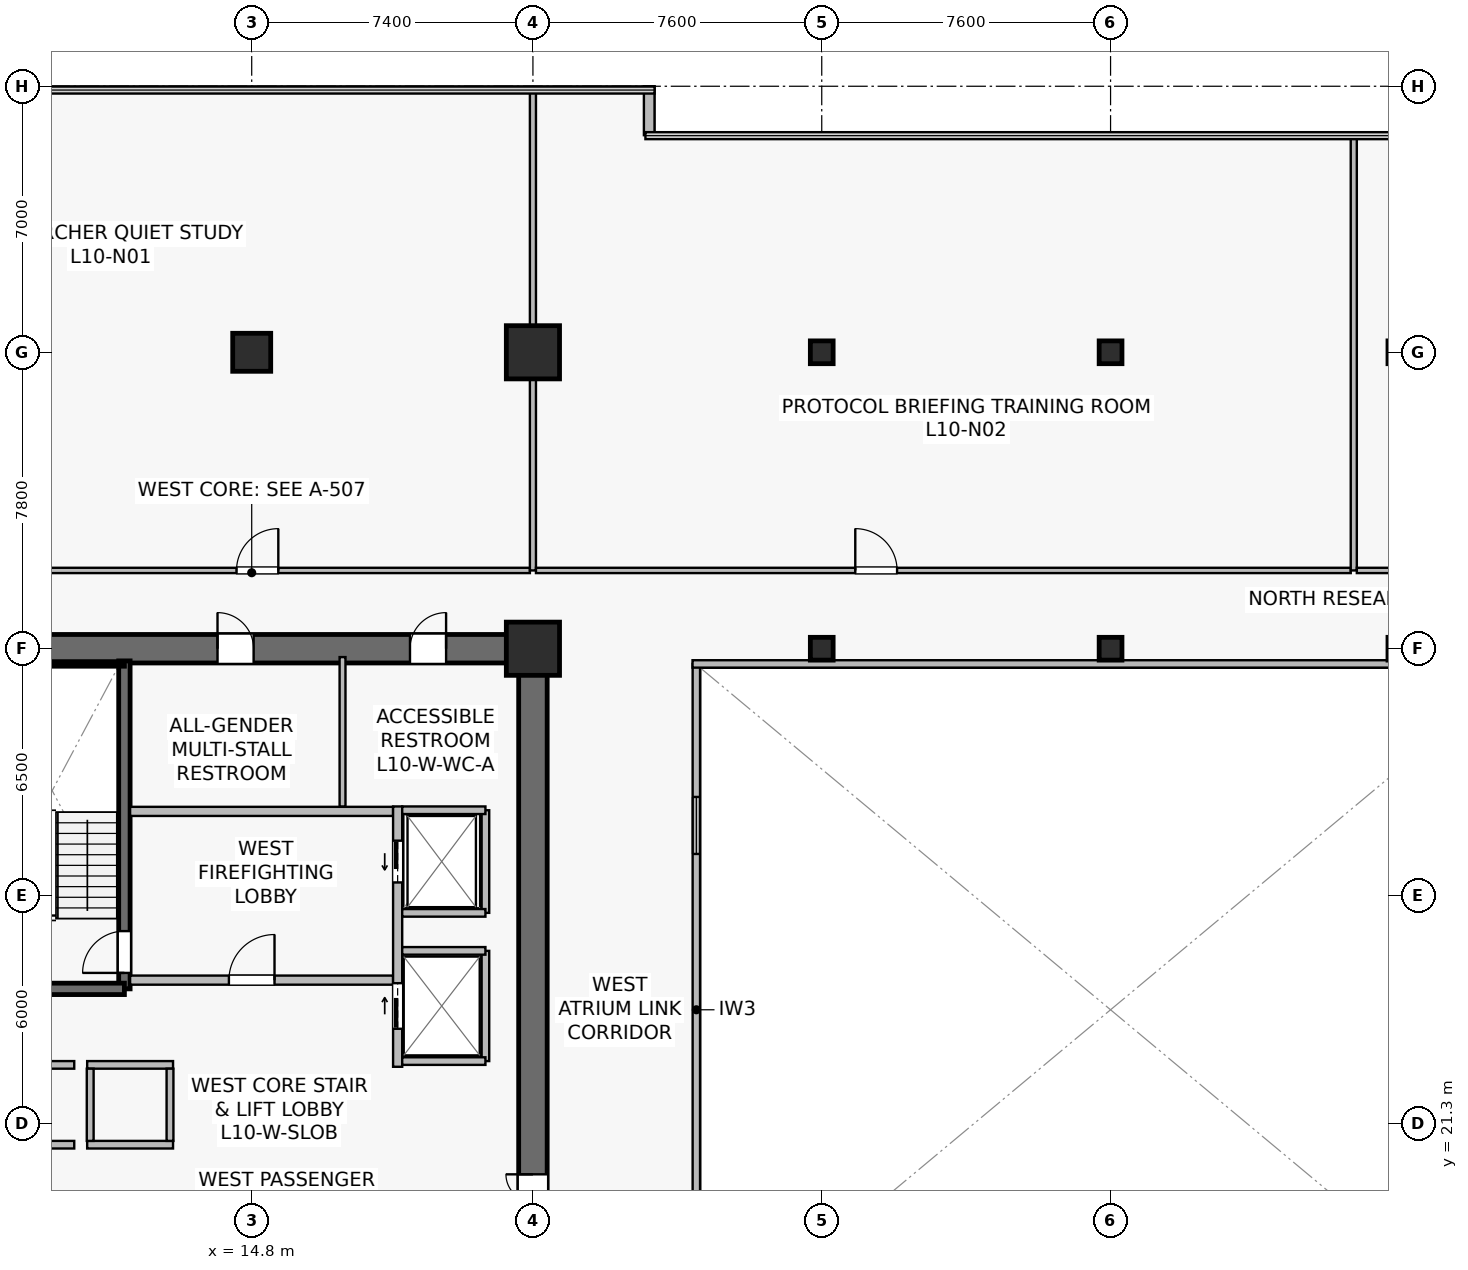
"""IFC4 building model, lengths in metres.
Left out: names, types, materials, properties, quantities, classifications, styles, units other than length and angle.
Written with IfcOpenShell. Run it as: python <this file> out.ifc"""

import sys

from ifc_helpers import new_model, si_unit, direction, frame, frame_2d, origin, origin_2d, place, context, subcontext, project, spatial, rectangle, hollow_rectangle, extrude, source, transform, mapped, element, fill, save


model = new_model("IFC4")
c1 = context("Model", 3, precision=1e-05, world=origin(), true_north=direction((0.0, 1.0)))
c2 = subcontext(c1, "Body", "Model", "MODEL_VIEW")
j1 = project(units=[si_unit("LENGTHUNIT", "METRE"), si_unit("PLANEANGLEUNIT", "RADIAN")], contexts=[c1])
p1 = place(None, origin())
s1 = spatial("IfcSite", under=j1, at=p1, CompositionType="ELEMENT")
p2 = place(p1, origin())
s2 = spatial("IfcBuilding", under=s1, at=p2, CompositionType="ELEMENT")
p3 = place(p2, frame((0.0, 0.0, 41.6)))
s3 = spatial("IfcBuildingStorey", under=s2, at=p3, CompositionType="ELEMENT", Elevation=41.6)
p4 = place(p3, frame((7.025, 33.8, 0.0), z_axis=(0.0, 0.0, 1.0), x_axis=(1.0, 0.0, 0.0)))
e1 = element("IfcWall", 1, at=p4, inside=s3, PredefinedType="SHEAR", context=c2, shape_type="SweptSolid", body=[
    extrude(rectangle(XDim=15.55, YDim=0.75, at=frame_2d((7.775, 0.0))), origin(), (0.0, 0.0, 1.0), 3.78),
])
p5 = place(p4, frame((6.875, 0.0, 0.0)))
e2 = element("IfcOpeningElement", 2, at=p5, cuts=e1, PredefinedType="OPENING", context=c2, shape_type="SweptSolid", body=[
    extrude(rectangle(XDim=0.95, YDim=2.15, at=frame_2d((0.475, 1.075))), frame((0.0, 0.385, 0.0), z_axis=(0.0, -1.0, 0.0), x_axis=(1.0, 0.0, 0.0)), (0.0, 0.0, 1.0), 0.77),
])
p6 = place(p4, frame((11.94, 0.0, 0.0)))
e3 = element("IfcOpeningElement", 3, at=p6, cuts=e1, PredefinedType="OPENING", context=c2, shape_type="SweptSolid", body=[
    extrude(rectangle(XDim=0.95, YDim=2.15, at=frame_2d((0.475, 1.075))), frame((0.0, 0.385, 0.0), z_axis=(0.0, -1.0, 0.0), x_axis=(1.0, 0.0, 0.0)), (0.0, 0.0, 1.0), 0.77),
])
p7 = place(p3, frame((22.2, 15.175, 0.0), z_axis=(0.0, 0.0, 1.0), x_axis=(0.0, 1.0, 0.0)))
e4 = element("IfcWall", 4, at=p7, inside=s3, PredefinedType="SHEAR", context=c2, shape_type="SweptSolid", body=[
    extrude(rectangle(XDim=18.25, YDim=0.75, at=frame_2d((9.125, 0.0))), origin(), (0.0, 0.0, 1.0), 3.78),
])
p8 = place(p7, frame((3.375, 0.0, 0.0)))
e5 = element("IfcOpeningElement", 5, at=p8, cuts=e4, PredefinedType="OPENING", context=c2, shape_type="SweptSolid", body=[
    extrude(rectangle(XDim=1.42, YDim=2.2, at=frame_2d((0.71, 1.1))), frame((0.0, 0.385, 0.0), z_axis=(0.0, -1.0, 0.0), x_axis=(1.0, 0.0, 0.0)), (0.0, 0.0, 1.0), 0.77),
])
p9 = place(p3, frame((11.45, 24.85, 0.0), z_axis=(0.0, 0.0, 1.0), x_axis=(0.0, 1.0, 0.0)))
e6 = element("IfcWall", 6, at=p9, inside=s3, PredefinedType="SHEAR", context=c2, shape_type="SweptSolid", body=[
    extrude(rectangle(XDim=8.63, YDim=0.3, at=frame_2d((4.315, 0.0))), origin(), (0.0, 0.0, 1.0), 3.78),
])
p10 = place(p9, frame((0.42, 0.0, 0.0)))
e7 = element("IfcOpeningElement", 7, at=p10, cuts=e6, PredefinedType="OPENING", context=c2, shape_type="SweptSolid", body=[
    extrude(rectangle(XDim=1.1, YDim=2.15, at=frame_2d((0.55, 1.075))), frame((0.0, 0.16, 0.0), z_axis=(0.0, -1.0, 0.0), x_axis=(1.0, 0.0, 0.0)), (0.0, 0.0, 1.0), 0.32),
])
p11 = place(p3, frame((7.65, 24.85, 0.0), z_axis=(0.0, 0.0, 1.0), x_axis=(1.0, 0.0, 0.0)))
e8 = element("IfcWall", 8, at=p11, inside=s3, PredefinedType="SHEAR", context=c2, shape_type="SweptSolid", body=[
    extrude(rectangle(XDim=3.8, YDim=0.3, at=frame_2d((1.9, 0.0))), origin(), (0.0, 0.0, 1.0), 3.78),
])
p12 = place(p3, frame((7.73, 33.4, 0.0), z_axis=(0.0, 0.0, 1.0), x_axis=(1.0, 0.0, 0.0)))
e9 = element("IfcWall", 9, at=p12, inside=s3, PredefinedType="SOLIDWALL", context=c2, shape_type="SweptSolid", body=[
    extrude(rectangle(XDim=3.72, YDim=0.12, at=frame_2d((1.86, 0.0))), origin(), (0.0, 0.0, 1.0), 3.78),
])
m1 = source(origin(), c2, "Body", "SweptSolid", [
    extrude(rectangle(XDim=1.4, YDim=1.4, at=origin_2d()), origin(), (0.0, 0.0, 1.0), 4.1),
])
p13 = place(p3, frame((22.2, 33.8, 0.0), z_axis=(0.0, 0.0, 1.0), x_axis=(1.0, 0.0, 0.0)))
e10 = element("IfcColumn", 10, at=p13, inside=s3, PredefinedType="COLUMN", context=c2, shape_type="MappedRepresentation", body=[
    mapped(m1, transform((0.0, 0.0, 0.0), scale=1.0)),
])
m2 = source(origin(), c2, "Body", "SweptSolid", [
    extrude(rectangle(XDim=1.0, YDim=1.0, at=origin_2d()), origin(), (0.0, 0.0, 1.0), 4.1),
])
p14 = place(p3, frame((14.8, 41.6, 0.0), z_axis=(0.0, 0.0, 1.0), x_axis=(1.0, 0.0, 0.0)))
e11 = element("IfcColumn", 11, at=p14, inside=s3, PredefinedType="COLUMN", context=c2, shape_type="MappedRepresentation", body=[
    mapped(m2, transform((0.0, 0.0, 0.0), scale=1.0)),
])
p15 = place(p3, frame((22.2, 41.6, 0.0), z_axis=(0.0, 0.0, 1.0), x_axis=(1.0, 0.0, 0.0)))
e12 = element("IfcColumn", 12, at=p15, inside=s3, PredefinedType="COLUMN", context=c2, shape_type="MappedRepresentation", body=[
    mapped(m1, transform((0.0, 0.0, 0.0), scale=1.0)),
])
m3 = source(origin(), c2, "Body", "SweptSolid", [
    extrude(hollow_rectangle(XDim=0.6, YDim=0.6, WallThickness=0.028, at=origin_2d()), origin(), (0.0, 0.0, 1.0), 4.1),
])
for number, where, z_axis, x_axis in (
    (13, (29.8, 33.8, 0.0), (0.0, 0.0, 1.0), (1.0, 0.0, 0.0)),
    (14, (29.8, 41.6, 0.0), (0.0, 0.0, 1.0), (1.0, 0.0, 0.0)),
    (15, (37.4, 33.8, 0.0), (0.0, 0.0, 1.0), (1.0, 0.0, 0.0)),
    (16, (37.4, 41.6, 0.0), (0.0, 0.0, 1.0), (1.0, 0.0, 0.0)),
    (17, (45.0, 33.8, 0.0), (0.0, 0.0, 1.0), (1.0, 0.0, 0.0)),
    (18, (45.0, 41.6, 0.0), (0.0, 0.0, 1.0), (1.0, 0.0, 0.0)),
):
    element("IfcColumn", number, at=place(p3, frame(where, z_axis=z_axis, x_axis=x_axis)), inside=s3, PredefinedType="COLUMN", context=c2, shape_type="MappedRepresentation", body=[
        mapped(m3, transform((0.0, 0.0, 0.0), scale=1.0)),
    ])
p16 = place(p3, frame((25.26, 47.312, 0.0), z_axis=(0.0, 0.0, 1.0), x_axis=(0.0, 1.0, 0.0)))
e19 = element("IfcWall", 19, at=p16, inside=s3, PredefinedType="STANDARD", context=c2, shape_type="SweptSolid", body=[
    extrude(rectangle(XDim=1.288, YDim=0.28, at=frame_2d((0.644, 0.0))), origin(), (0.0, 0.0, 1.0), 3.78),
])
p17 = place(p3, frame((11.6, 25.08, 0.0), z_axis=(0.0, 0.0, 1.0), x_axis=(1.0, 0.0, 0.0)))
e20 = element("IfcWall", 20, at=p17, inside=s3, PredefinedType="SOLIDWALL", context=c2, shape_type="SweptSolid", body=[
    extrude(rectangle(XDim=6.92, YDim=0.24, at=frame_2d((3.46, 0.0))), origin(), (0.0, 0.0, 1.0), 3.065),
])
p18 = place(p17, frame((2.6, 0.0, 0.0)))
e21 = element("IfcOpeningElement", 21, at=p18, cuts=e20, PredefinedType="OPENING", context=c2, shape_type="SweptSolid", body=[
    extrude(rectangle(XDim=1.2, YDim=2.16, at=frame_2d((0.6, 1.08))), frame((0.0, 0.13, 0.0), z_axis=(0.0, -1.0, 0.0), x_axis=(1.0, 0.0, 0.0)), (0.0, 0.0, 1.0), 0.26),
])
p19 = place(p3, frame((11.6, 29.52, 0.0), z_axis=(0.0, 0.0, 1.0), x_axis=(1.0, 0.0, 0.0)))
e22 = element("IfcWall", 22, at=p19, inside=s3, PredefinedType="SOLIDWALL", context=c2, shape_type="SweptSolid", body=[
    extrude(rectangle(XDim=6.92, YDim=0.24, at=frame_2d((3.46, 0.0))), origin(), (0.0, 0.0, 1.0), 3.065),
])
p20 = place(p3, frame((18.64, 22.8, 0.0), z_axis=(0.0, 0.0, 1.0), x_axis=(0.0, 1.0, 0.0)))
e23 = element("IfcWall", 23, at=p20, inside=s3, PredefinedType="SOLIDWALL", context=c2, shape_type="SweptSolid", body=[
    extrude(rectangle(XDim=6.85, YDim=0.24, at=frame_2d((3.425, 0.0))), origin(), (0.0, 0.0, 1.0), 2.865),
])
p21 = place(p20, frame((4.85, 0.0, 0.0)))
e24 = element("IfcOpeningElement", 24, at=p21, cuts=e23, PredefinedType="OPENING", context=c2, shape_type="SweptSolid", body=[
    extrude(rectangle(XDim=1.1, YDim=2.22, at=frame_2d((0.55, 1.11))), frame((0.0, 0.13, 0.0), z_axis=(0.0, -1.0, 0.0), x_axis=(1.0, 0.0, 0.0)), (0.0, 0.0, 1.0), 0.26),
])
p22 = place(p20, frame((1.0, 0.0, 0.0)))
e25 = element("IfcOpeningElement", 25, at=p22, cuts=e23, PredefinedType="OPENING", context=c2, shape_type="SweptSolid", body=[
    extrude(rectangle(XDim=1.2, YDim=2.22, at=frame_2d((0.6, 1.11))), frame((0.0, 0.13, 0.0), z_axis=(0.0, -1.0, 0.0), x_axis=(1.0, 0.0, 0.0)), (0.0, 0.0, 1.0), 0.26),
])
for number, where, z_axis, x_axis in (
    (26, (7.87, 20.75, 0.0), (0.0, 0.0, 1.0), (1.0, 0.0, 0.0)),
    (27, (7.87, 22.85, 0.0), (0.0, 0.0, 1.0), (1.0, 0.0, 0.0)),
):
    element("IfcWall", number, at=place(p3, frame(where, z_axis=z_axis, x_axis=x_axis)), inside=s3, PredefinedType="SOLIDWALL", context=c2, shape_type="SweptSolid", body=[
        extrude(rectangle(XDim=2.26, YDim=0.2, at=frame_2d((1.13, 0.0))), origin(), (0.0, 0.0, 1.0), 3.78),
    ])
for number, where, z_axis, x_axis in (
    (28, (10.47, 20.75, 0.0), (0.0, 0.0, 1.0), (1.0, 0.0, 0.0)),
    (29, (10.47, 22.85, 0.0), (0.0, 0.0, 1.0), (1.0, 0.0, 0.0)),
):
    element("IfcWall", number, at=place(p3, frame(where, z_axis=z_axis, x_axis=x_axis)), inside=s3, PredefinedType="SOLIDWALL", context=c2, shape_type="SweptSolid", body=[
        extrude(rectangle(XDim=2.26, YDim=0.2, at=frame_2d((1.13, 0.0))), origin(), (0.0, 0.0, 1.0), 3.78),
    ])
for number, where, z_axis, x_axis in (
    (30, (10.55, 20.85, 0.0), (0.0, 0.0, 1.0), (0.0, 1.0, 0.0)),
    (31, (12.65, 20.85, 0.0), (0.0, 0.0, 1.0), (0.0, 1.0, 0.0)),
):
    element("IfcWall", number, at=place(p3, frame(where, z_axis=z_axis, x_axis=x_axis)), inside=s3, PredefinedType="SOLIDWALL", context=c2, shape_type="SweptSolid", body=[
        extrude(rectangle(XDim=1.9, YDim=0.18, at=frame_2d((0.95, 0.0))), origin(), (0.0, 0.0, 1.0), 3.78),
    ])
p23 = place(p3, frame((20.95, 26.85, 0.0), z_axis=(0.0, 0.0, 1.0), x_axis=(0.0, 1.0, 0.0)))
e32 = element("IfcWall", 32, at=p23, inside=s3, PredefinedType="SOLIDWALL", context=c2, shape_type="SweptSolid", body=[
    extrude(rectangle(XDim=2.7, YDim=0.2, at=frame_2d((1.35, 0.0))), origin(), (0.0, 0.0, 1.0), 3.78),
])
p24 = place(p3, frame((18.76, 29.55, 0.0), z_axis=(0.0, 0.0, 1.0), x_axis=(1.0, 0.0, 0.0)))
e33 = element("IfcWall", 33, at=p24, inside=s3, PredefinedType="SOLIDWALL", context=c2, shape_type="SweptSolid", body=[
    extrude(rectangle(XDim=2.19, YDim=0.2, at=frame_2d((1.095, 0.0))), origin(), (0.0, 0.0, 1.0), 3.78),
])
p25 = place(p3, frame((18.76, 26.85, 0.0), z_axis=(0.0, 0.0, 1.0), x_axis=(1.0, 0.0, 0.0)))
e34 = element("IfcWall", 34, at=p25, inside=s3, PredefinedType="SOLIDWALL", context=c2, shape_type="SweptSolid", body=[
    extrude(rectangle(XDim=2.19, YDim=0.2, at=frame_2d((1.095, 0.0))), origin(), (0.0, 0.0, 1.0), 3.177),
])
p26 = place(p3, frame((20.95, 22.95, 0.0), z_axis=(0.0, 0.0, 1.0), x_axis=(0.0, 1.0, 0.0)))
e35 = element("IfcWall", 35, at=p26, inside=s3, PredefinedType="SOLIDWALL", context=c2, shape_type="SweptSolid", body=[
    extrude(rectangle(XDim=2.9, YDim=0.2, at=frame_2d((1.45, 0.0))), origin(), (0.0, 0.0, 1.0), 2.865),
])
for number, where, z_axis, x_axis in (
    (36, (18.76, 25.85, 0.0), (0.0, 0.0, 1.0), (1.0, 0.0, 0.0)),
    (37, (18.76, 22.95, 0.0), (0.0, 0.0, 1.0), (1.0, 0.0, 0.0)),
):
    element("IfcWall", number, at=place(p3, frame(where, z_axis=z_axis, x_axis=x_axis)), inside=s3, PredefinedType="SOLIDWALL", context=c2, shape_type="SweptSolid", body=[
        extrude(rectangle(XDim=2.19, YDim=0.2, at=frame_2d((1.095, 0.0))), origin(), (0.0, 0.0, 1.0), 3.78),
    ])
p27 = place(p3, frame((17.19, 29.65, 0.0), z_axis=(0.0, 0.0, 1.0), x_axis=(0.0, 1.0, 0.0)))
e38 = element("IfcWall", 38, at=p27, inside=s3, PredefinedType="PLUMBINGWALL", context=c2, shape_type="SweptSolid", body=[
    extrude(rectangle(XDim=3.93, YDim=0.155, at=frame_2d((1.965, 0.0))), origin(), (0.0, 0.0, 1.0), 3.78),
])
p28 = place(p3, frame((26.5, 15.2, 0.0), z_axis=(0.0, 0.0, 1.0), x_axis=(0.0, 1.0, 0.0)))
e39 = element("IfcWall", 39, at=p28, inside=s3, PredefinedType="SOLIDWALL", context=c2, shape_type="SweptSolid", body=[
    extrude(rectangle(XDim=18.2, YDim=0.195, at=frame_2d((9.1, 0.0))), origin(), (0.0, 0.0, 1.0), 3.78),
])
p29 = place(p28, frame((1.8, 0.0, 0.9)))
e40 = element("IfcOpeningElement", 40, at=p29, cuts=e39, PredefinedType="OPENING", context=c2, shape_type="SweptSolid", body=[
    extrude(rectangle(XDim=1.5, YDim=1.4, at=frame_2d((0.75, 0.7))), frame((0.0, 0.107, 0.0), z_axis=(0.0, -1.0, 0.0), x_axis=(1.0, 0.0, 0.0)), (0.0, 0.0, 1.0), 0.215),
])
p30 = place(p28, frame((13.2, 0.0, 0.9)))
e41 = element("IfcOpeningElement", 41, at=p30, cuts=e39, PredefinedType="OPENING", context=c2, shape_type="SweptSolid", body=[
    extrude(rectangle(XDim=1.5, YDim=1.4, at=frame_2d((0.75, 0.7))), frame((0.0, 0.107, 0.0), z_axis=(0.0, -1.0, 0.0), x_axis=(1.0, 0.0, 0.0)), (0.0, 0.0, 1.0), 0.215),
])
p31 = place(p3, frame((26.4, 33.4, 0.0), z_axis=(0.0, 0.0, 1.0), x_axis=(1.0, 0.0, 0.0)))
e42 = element("IfcWall", 42, at=p31, inside=s3, PredefinedType="SOLIDWALL", context=c2, shape_type="SweptSolid", body=[
    extrude(rectangle(XDim=22.0, YDim=0.195, at=frame_2d((11.0, 0.0))), origin(), (0.0, 0.0, 1.0), 3.78),
])
p32 = place(p3, frame((6.98, 35.86, 0.0), z_axis=(0.0, 0.0, 1.0), x_axis=(1.0, 0.0, 0.0)))
e43 = element("IfcWall", 43, at=p32, inside=s3, PredefinedType="PARTITIONING", context=c2, shape_type="SweptSolid", body=[
    extrude(rectangle(XDim=15.14, YDim=0.14, at=frame_2d((7.57, 0.0))), origin(), (0.0, 0.0, 1.0), 3.065),
])
p33 = place(p32, frame((7.42, 0.0, 0.0)))
e44 = element("IfcOpeningElement", 44, at=p33, cuts=e43, PredefinedType="OPENING", context=c2, shape_type="SweptSolid", body=[
    extrude(rectangle(XDim=1.1, YDim=2.18, at=frame_2d((0.55, 1.09))), frame((0.0, 0.08, 0.0), z_axis=(0.0, -1.0, 0.0), x_axis=(1.0, 0.0, 0.0)), (0.0, 0.0, 1.0), 0.16),
])
p34 = place(p3, frame((22.2, 35.86, 0.0), z_axis=(0.0, 0.0, 1.0), x_axis=(0.0, 1.0, 0.0)))
e45 = element("IfcWall", 45, at=p34, inside=s3, PredefinedType="PARTITIONING", context=c2, shape_type="SweptSolid", body=[
    extrude(rectangle(XDim=12.63, YDim=0.16, at=frame_2d((6.315, 0.0))), origin(), (0.0, 0.0, 1.0), 3.015),
])
p35 = place(p3, frame((22.28, 35.86, 0.0), z_axis=(0.0, 0.0, 1.0), x_axis=(1.0, 0.0, 0.0)))
e46 = element("IfcWall", 46, at=p35, inside=s3, PredefinedType="PARTITIONING", context=c2, shape_type="SweptSolid", body=[
    extrude(rectangle(XDim=21.44, YDim=0.14, at=frame_2d((10.72, 0.0))), origin(), (0.0, 0.0, 1.0), 3.065),
])
p36 = place(p35, frame((8.402, 0.0, 0.0)))
e47 = element("IfcOpeningElement", 47, at=p36, cuts=e46, PredefinedType="OPENING", context=c2, shape_type="SweptSolid", body=[
    extrude(rectangle(XDim=1.1, YDim=2.18, at=frame_2d((0.55, 1.09))), frame((0.0, 0.08, 0.0), z_axis=(0.0, -1.0, 0.0), x_axis=(1.0, 0.0, 0.0)), (0.0, 0.0, 1.0), 0.16),
])
p37 = place(p3, frame((43.8, 35.86, 0.0), z_axis=(0.0, 0.0, 1.0), x_axis=(0.0, 1.0, 0.0)))
e48 = element("IfcWall", 48, at=p37, inside=s3, PredefinedType="PARTITIONING", context=c2, shape_type="SweptSolid", body=[
    extrude(rectangle(XDim=11.43, YDim=0.16, at=frame_2d((5.715, 0.0))), origin(), (0.0, 0.0, 1.0), 3.015),
])
p38 = place(p3, frame((43.88, 35.86, 0.0), z_axis=(0.0, 0.0, 1.0), x_axis=(1.0, 0.0, 0.0)))
e49 = element("IfcWall", 49, at=p38, inside=s3, PredefinedType="PARTITIONING", context=c2, shape_type="SweptSolid", body=[
    extrude(rectangle(XDim=23.94, YDim=0.14, at=frame_2d((11.97, 0.0))), origin(), (0.0, 0.0, 1.0), 3.065),
])
p39 = place(p38, frame((12.084, 0.0, 0.0)))
e50 = element("IfcOpeningElement", 50, at=p39, cuts=e49, PredefinedType="OPENING", context=c2, shape_type="SweptSolid", body=[
    extrude(rectangle(XDim=1.1, YDim=2.18, at=frame_2d((0.55, 1.09))), frame((0.0, 0.08, 0.0), z_axis=(0.0, -1.0, 0.0), x_axis=(1.0, 0.0, 0.0)), (0.0, 0.0, 1.0), 0.16),
])
m4 = source(origin(), c2, "Body", "SweptSolid", [
    extrude(rectangle(XDim=1.5, YDim=1.4, at=frame_2d((0.75, 0.7))), frame((0.0, 0.03, 0.0), z_axis=(0.0, -1.0, 0.0), x_axis=(1.0, 0.0, 0.0)), (0.0, 0.0, 1.0), 0.06),
])
p40 = place(p30, origin())
e51 = element("IfcWindow", 51, at=p40, inside=s3, PartitioningType="SINGLE_PANEL", PredefinedType="WINDOW", context=c2, shape_type="MappedRepresentation", body=[
    mapped(m4, transform((0.0, 0.0, 0.0), scale=1.0)),
])
fill(e41, e51)
m5 = source(origin(), c2, "Body", "SweptSolid", [
    extrude(rectangle(XDim=1.1, YDim=2.15, at=frame_2d((0.55, 1.075))), frame((0.0, 0.025, 0.0), z_axis=(0.0, -1.0, 0.0), x_axis=(1.0, 0.0, 0.0)), (0.0, 0.0, 1.0), 0.05),
])
p41 = place(p10, origin())
e52 = element("IfcDoor", 52, at=p41, inside=s3, OperationType="SINGLE_SWING_LEFT", PredefinedType="DOOR", context=c2, shape_type="MappedRepresentation", body=[
    mapped(m5, transform((0.0, 0.0, 0.0), scale=1.0)),
])
fill(e7, e52)
m6 = source(origin(), c2, "Body", "SweptSolid", [
    extrude(rectangle(XDim=1.2, YDim=2.16, at=frame_2d((0.6, 1.08))), frame((0.0, 0.025, 0.0), z_axis=(0.0, -1.0, 0.0), x_axis=(1.0, 0.0, 0.0)), (0.0, 0.0, 1.0), 0.05),
])
p42 = place(p18, origin())
e53 = element("IfcDoor", 53, at=p42, inside=s3, OperationType="SINGLE_SWING_RIGHT", PredefinedType="DOOR", context=c2, shape_type="MappedRepresentation", body=[
    mapped(m6, transform((0.0, 0.0, 0.0), scale=1.0)),
])
fill(e21, e53)
m7 = source(origin(), c2, "Body", "SweptSolid", [
    extrude(rectangle(XDim=1.1, YDim=2.22, at=frame_2d((0.55, 1.11))), frame((0.0, 0.025, 0.0), z_axis=(0.0, -1.0, 0.0), x_axis=(1.0, 0.0, 0.0)), (0.0, 0.0, 1.0), 0.05),
])
p43 = place(p21, origin())
e54 = element("IfcDoor", 54, at=p43, inside=s3, OperationType="SLIDING_TO_LEFT", PredefinedType="USERDEFINED", context=c2, shape_type="MappedRepresentation", body=[
    mapped(m7, transform((0.0, 0.0, 0.0), scale=1.0)),
])
fill(e24, e54)
m8 = source(origin(), c2, "Body", "SweptSolid", [
    extrude(rectangle(XDim=1.2, YDim=2.22, at=frame_2d((0.6, 1.11))), frame((0.0, 0.025, 0.0), z_axis=(0.0, -1.0, 0.0), x_axis=(1.0, 0.0, 0.0)), (0.0, 0.0, 1.0), 0.05),
])
p44 = place(p22, origin())
e55 = element("IfcDoor", 55, at=p44, inside=s3, OperationType="SLIDING_TO_RIGHT", PredefinedType="USERDEFINED", context=c2, shape_type="MappedRepresentation", body=[
    mapped(m8, transform((0.0, 0.0, 0.0), scale=1.0)),
])
fill(e25, e55)
m9 = source(origin(), c2, "Body", "SweptSolid", [
    extrude(rectangle(XDim=1.42, YDim=2.2, at=frame_2d((0.71, 1.1))), frame((0.0, 0.025, 0.0), z_axis=(0.0, -1.0, 0.0), x_axis=(1.0, 0.0, 0.0)), (0.0, 0.0, 1.0), 0.05),
])
p45 = place(p8, origin())
e56 = element("IfcDoor", 56, at=p45, inside=s3, OperationType="DOUBLE_DOOR_SINGLE_SWING", PredefinedType="DOOR", context=c2, shape_type="MappedRepresentation", body=[
    mapped(m9, transform((0.0, 0.0, 0.0), scale=1.0)),
])
fill(e5, e56)
m10 = source(origin(), c2, "Body", "SweptSolid", [
    extrude(rectangle(XDim=0.95, YDim=2.15, at=frame_2d((0.475, 1.075))), frame((0.0, 0.025, 0.0), z_axis=(0.0, -1.0, 0.0), x_axis=(1.0, 0.0, 0.0)), (0.0, 0.0, 1.0), 0.05),
])
p46 = place(p5, origin())
e57 = element("IfcDoor", 57, at=p46, inside=s3, OperationType="SINGLE_SWING_LEFT", PredefinedType="DOOR", context=c2, shape_type="MappedRepresentation", body=[
    mapped(m10, transform((0.0, 0.0, 0.0), scale=1.0)),
])
fill(e2, e57)
p47 = place(p6, origin())
e58 = element("IfcDoor", 58, at=p47, inside=s3, OperationType="SINGLE_SWING_RIGHT", PredefinedType="DOOR", context=c2, shape_type="MappedRepresentation", body=[
    mapped(m10, transform((0.0, 0.0, 0.0), scale=1.0)),
])
fill(e3, e58)
m11 = source(origin(), c2, "Body", "SweptSolid", [
    extrude(rectangle(XDim=1.1, YDim=2.18, at=frame_2d((0.55, 1.09))), frame((0.0, 0.025, 0.0), z_axis=(0.0, -1.0, 0.0), x_axis=(1.0, 0.0, 0.0)), (0.0, 0.0, 1.0), 0.05),
])
p48 = place(p33, origin())
e59 = element("IfcDoor", 59, at=p48, inside=s3, OperationType="SINGLE_SWING_RIGHT", PredefinedType="DOOR", context=c2, shape_type="MappedRepresentation", body=[
    mapped(m11, transform((0.0, 0.0, 0.0), scale=1.0)),
])
fill(e44, e59)
p49 = place(p36, origin())
e60 = element("IfcDoor", 60, at=p49, inside=s3, OperationType="SINGLE_SWING_LEFT", PredefinedType="DOOR", context=c2, shape_type="MappedRepresentation", body=[
    mapped(m11, transform((0.0, 0.0, 0.0), scale=1.0)),
])
fill(e47, e60)
save(model, sys.argv[1])
